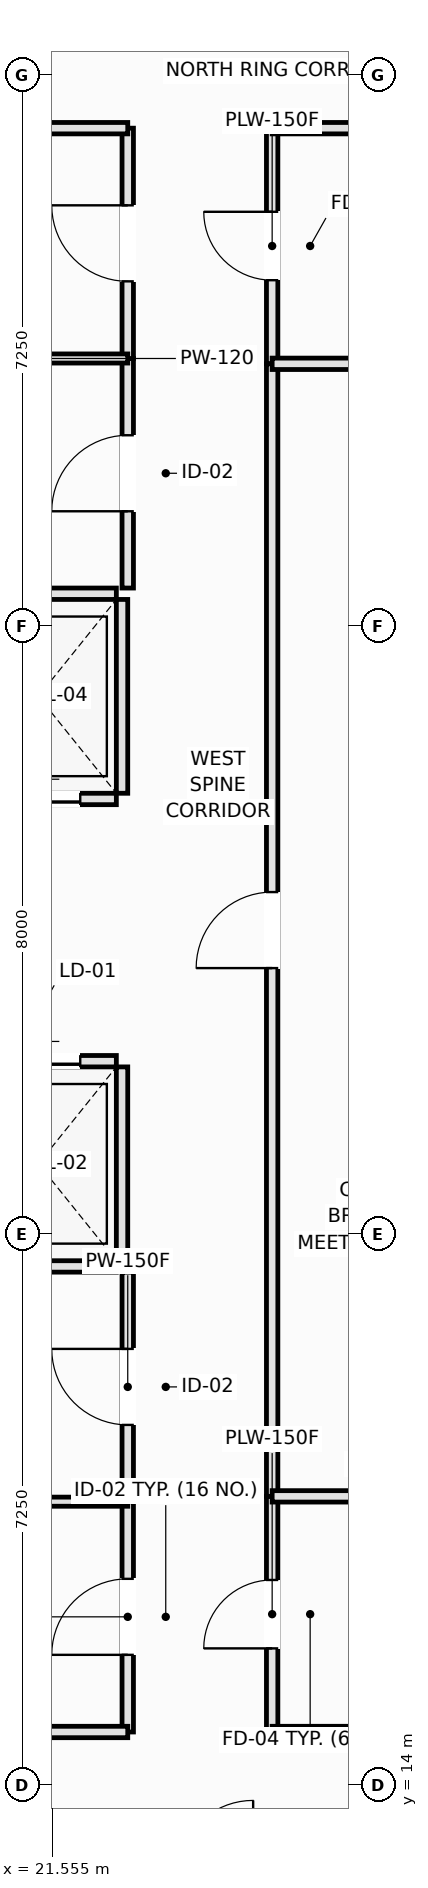
"""IFC4 building model, lengths in metres.
Left out: names, types, materials, properties, quantities, classifications, styles, units other than length and angle.
Written with IfcOpenShell. Run it as: python <this file> out.ifc"""

import sys

from ifc_helpers import new_model, si_unit, direction, frame, frame_2d, origin, place, context, subcontext, project, spatial, rectangle, extrude, element, fill, save


model = new_model("IFC4")
c1 = context("Model", 3, precision=1e-05, world=origin(), true_north=direction((0.0, 1.0)))
c2 = subcontext(c1, "Body", "Model", "MODEL_VIEW")
j1 = project(units=[si_unit("LENGTHUNIT", "METRE"), si_unit("PLANEANGLEUNIT", "RADIAN")], contexts=[c1])
p1 = place(None, origin())
s1 = spatial("IfcSite", under=j1, at=p1, CompositionType="ELEMENT")
p2 = place(p1, origin())
s2 = spatial("IfcBuilding", under=s1, at=p2, CompositionType="ELEMENT")
p3 = place(p2, frame((0.0, 0.0, 25.6)))
s3 = spatial("IfcBuildingStorey", under=s2, at=p3, CompositionType="ELEMENT", Elevation=25.6)
p4 = place(p3, frame((20.35, 20.825, 0.0), z_axis=(0.0, 0.0, 1.0), x_axis=(1.0, 0.0, 0.0)))
e1 = element("IfcWall", 1, at=p4, inside=s3, PredefinedType="PARTITIONING", context=c2, shape_type="SweptSolid", body=[
    extrude(rectangle(XDim=2.05, YDim=0.15, at=frame_2d((1.025, 0.0))), origin(), (0.0, 0.0, 1.0), 3.37),
])
p5 = place(p3, frame((20.35, 23.525, 0.0), z_axis=(0.0, 0.0, 1.0), x_axis=(1.0, 0.0, 0.0)))
e2 = element("IfcWall", 2, at=p5, inside=s3, PredefinedType="PARTITIONING", context=c2, shape_type="SweptSolid", body=[
    extrude(rectangle(XDim=2.05, YDim=0.15, at=frame_2d((1.025, 0.0))), origin(), (0.0, 0.0, 1.0), 3.37),
])
p6 = place(p5, frame((0.475, 0.0, 0.0)))
e3 = element("IfcOpeningElement", 3, at=p6, cuts=e2, PredefinedType="OPENING", context=c2, shape_type="SweptSolid", body=[
    extrude(rectangle(XDim=1.1, YDim=2.2, at=frame_2d((0.55, 1.1))), frame((0.0, 0.085, 0.0), z_axis=(0.0, -1.0, 0.0), x_axis=(1.0, 0.0, 0.0)), (0.0, 0.0, 1.0), 0.17),
])
p7 = place(p3, frame((22.475, 20.9, 0.0), z_axis=(0.0, 0.0, 1.0), x_axis=(0.0, 1.0, 0.0)))
e4 = element("IfcWall", 4, at=p7, inside=s3, PredefinedType="PARTITIONING", context=c2, shape_type="SweptSolid", body=[
    extrude(rectangle(XDim=2.55, YDim=0.15, at=frame_2d((1.275, 0.0))), origin(), (0.0, 0.0, 1.0), 3.37),
])
p8 = place(p3, frame((20.35, 26.975, 0.0), z_axis=(0.0, 0.0, 1.0), x_axis=(1.0, 0.0, 0.0)))
e5 = element("IfcWall", 5, at=p8, inside=s3, PredefinedType="PARTITIONING", context=c2, shape_type="SweptSolid", body=[
    extrude(rectangle(XDim=2.05, YDim=0.15, at=frame_2d((1.025, 0.0))), origin(), (0.0, 0.0, 1.0), 3.37),
])
p9 = place(p8, frame((0.475, 0.0, 0.0)))
e6 = element("IfcOpeningElement", 6, at=p9, cuts=e5, PredefinedType="OPENING", context=c2, shape_type="SweptSolid", body=[
    extrude(rectangle(XDim=1.1, YDim=2.2, at=frame_2d((0.55, 1.1))), frame((0.0, 0.085, 0.0), z_axis=(0.0, -1.0, 0.0), x_axis=(1.0, 0.0, 0.0)), (0.0, 0.0, 1.0), 0.17),
])
p10 = place(p3, frame((20.35, 29.675, 0.0), z_axis=(0.0, 0.0, 1.0), x_axis=(1.0, 0.0, 0.0)))
e7 = element("IfcWall", 7, at=p10, inside=s3, PredefinedType="PARTITIONING", context=c2, shape_type="SweptSolid", body=[
    extrude(rectangle(XDim=2.05, YDim=0.15, at=frame_2d((1.025, 0.0))), origin(), (0.0, 0.0, 1.0), 3.37),
])
p11 = place(p3, frame((22.475, 27.05, 0.0), z_axis=(0.0, 0.0, 1.0), x_axis=(0.0, 1.0, 0.0)))
e8 = element("IfcWall", 8, at=p11, inside=s3, PredefinedType="PARTITIONING", context=c2, shape_type="SweptSolid", body=[
    extrude(rectangle(XDim=2.55, YDim=0.15, at=frame_2d((1.275, 0.0))), origin(), (0.0, 0.0, 1.0), 3.37),
])
p12 = place(p3, frame((22.55, 14.7, 0.0), z_axis=(0.0, 0.0, 1.0), x_axis=(0.0, 1.0, 0.0)))
e9 = element("IfcWall", 9, at=p12, inside=s3, PredefinedType="PARTITIONING", context=c2, shape_type="SweptSolid", body=[
    extrude(rectangle(XDim=3.03, YDim=0.15, at=frame_2d((1.515, 0.0))), origin(), (0.0, 0.0, 1.0), 3.01),
])
p13 = place(p12, frame((1.015, 0.0, 0.0)))
e10 = element("IfcOpeningElement", 10, at=p13, cuts=e9, PredefinedType="OPENING", context=c2, shape_type="SweptSolid", body=[
    extrude(rectangle(XDim=1.0, YDim=2.15, at=frame_2d((0.5, 1.075))), frame((0.0, 0.085, 0.0), z_axis=(0.0, -1.0, 0.0), x_axis=(1.0, 0.0, 0.0)), (0.0, 0.0, 1.0), 0.17),
])
p14 = place(p3, frame((22.55, 17.73, 0.0), z_axis=(0.0, 0.0, 1.0), x_axis=(0.0, 1.0, 0.0)))
e11 = element("IfcWall", 11, at=p14, inside=s3, PredefinedType="PARTITIONING", context=c2, shape_type="SweptSolid", body=[
    extrude(rectangle(XDim=3.02, YDim=0.15, at=frame_2d((1.51, 0.0))), origin(), (0.0, 0.0, 1.0), 3.01),
])
p15 = place(p14, frame((1.01, 0.0, 0.0)))
e12 = element("IfcOpeningElement", 12, at=p15, cuts=e11, PredefinedType="OPENING", context=c2, shape_type="SweptSolid", body=[
    extrude(rectangle(XDim=1.0, YDim=2.15, at=frame_2d((0.5, 1.075))), frame((0.0, 0.085, 0.0), z_axis=(0.0, -1.0, 0.0), x_axis=(1.0, 0.0, 0.0)), (0.0, 0.0, 1.0), 0.17),
])
p16 = place(p3, frame((22.55, 29.75, 0.0), z_axis=(0.0, 0.0, 1.0), x_axis=(0.0, 1.0, 0.0)))
e13 = element("IfcWall", 13, at=p16, inside=s3, PredefinedType="PARTITIONING", context=c2, shape_type="SweptSolid", body=[
    extrude(rectangle(XDim=3.02, YDim=0.15, at=frame_2d((1.51, 0.0))), origin(), (0.0, 0.0, 1.0), 3.01),
])
p17 = place(p16, frame((1.01, 0.0, 0.0)))
e14 = element("IfcOpeningElement", 14, at=p17, cuts=e13, PredefinedType="OPENING", context=c2, shape_type="SweptSolid", body=[
    extrude(rectangle(XDim=1.0, YDim=2.15, at=frame_2d((0.5, 1.075))), frame((0.0, 0.085, 0.0), z_axis=(0.0, -1.0, 0.0), x_axis=(1.0, 0.0, 0.0)), (0.0, 0.0, 1.0), 0.17),
])
p18 = place(p3, frame((22.55, 32.77, 0.0), z_axis=(0.0, 0.0, 1.0), x_axis=(0.0, 1.0, 0.0)))
e15 = element("IfcWall", 15, at=p18, inside=s3, PredefinedType="PARTITIONING", context=c2, shape_type="SweptSolid", body=[
    extrude(rectangle(XDim=3.03, YDim=0.15, at=frame_2d((1.515, 0.0))), origin(), (0.0, 0.0, 1.0), 3.01),
])
p19 = place(p18, frame((1.015, 0.0, 0.0)))
e16 = element("IfcOpeningElement", 16, at=p19, cuts=e15, PredefinedType="OPENING", context=c2, shape_type="SweptSolid", body=[
    extrude(rectangle(XDim=1.0, YDim=2.15, at=frame_2d((0.5, 1.075))), frame((0.0, 0.085, 0.0), z_axis=(0.0, -1.0, 0.0), x_axis=(1.0, 0.0, 0.0)), (0.0, 0.0, 1.0), 0.17),
])
p20 = place(p3, frame((24.45, 14.7, 0.0), z_axis=(0.0, 0.0, 1.0), x_axis=(0.0, 1.0, 0.0)))
e17 = element("IfcWall", 17, at=p20, inside=s3, PredefinedType="PLUMBINGWALL", context=c2, shape_type="SweptSolid", body=[
    extrude(rectangle(XDim=3.1, YDim=0.15, at=frame_2d((1.55, 0.0))), origin(), (0.0, 0.0, 1.0), 3.37),
])
p21 = place(p20, frame((1.1, 0.0, 0.0)))
e18 = element("IfcOpeningElement", 18, at=p21, cuts=e17, PredefinedType="OPENING", context=c2, shape_type="SweptSolid", body=[
    extrude(rectangle(XDim=0.9, YDim=2.1, at=frame_2d((0.45, 1.05))), frame((0.0, 0.085, 0.0), z_axis=(0.0, -1.0, 0.0), x_axis=(1.0, 0.0, 0.0)), (0.0, 0.0, 1.0), 0.17),
])
p22 = place(p3, frame((24.45, 32.7, 0.0), z_axis=(0.0, 0.0, 1.0), x_axis=(0.0, 1.0, 0.0)))
e19 = element("IfcWall", 19, at=p22, inside=s3, PredefinedType="PLUMBINGWALL", context=c2, shape_type="SweptSolid", body=[
    extrude(rectangle(XDim=3.1, YDim=0.15, at=frame_2d((1.55, 0.0))), origin(), (0.0, 0.0, 1.0), 3.37),
])
p23 = place(p22, frame((1.1, 0.0, 0.0)))
e20 = element("IfcOpeningElement", 20, at=p23, cuts=e19, PredefinedType="OPENING", context=c2, shape_type="SweptSolid", body=[
    extrude(rectangle(XDim=0.9, YDim=2.1, at=frame_2d((0.45, 1.05))), frame((0.0, 0.085, 0.0), z_axis=(0.0, -1.0, 0.0), x_axis=(1.0, 0.0, 0.0)), (0.0, 0.0, 1.0), 0.17),
])
p24 = place(p3, frame((24.45, 17.8, 0.0), z_axis=(0.0, 0.0, 1.0), x_axis=(0.0, 1.0, 0.0)))
e21 = element("IfcWall", 21, at=p24, inside=s3, PredefinedType="PARTITIONING", context=c2, shape_type="SweptSolid", body=[
    extrude(rectangle(XDim=14.9, YDim=0.15, at=frame_2d((7.45, 0.0))), origin(), (0.0, 0.0, 1.0), 3.37),
])
p25 = place(p24, frame((6.95, 0.0, 0.0)))
e22 = element("IfcOpeningElement", 22, at=p25, cuts=e21, PredefinedType="OPENING", context=c2, shape_type="SweptSolid", body=[
    extrude(rectangle(XDim=1.0, YDim=2.15, at=frame_2d((0.5, 1.075))), frame((0.0, 0.085, 0.0), z_axis=(0.0, -1.0, 0.0), x_axis=(1.0, 0.0, 0.0)), (0.0, 0.0, 1.0), 0.17),
])
p26 = place(p3, frame((19.9, 14.7, 0.0), z_axis=(0.0, 0.0, 1.0), x_axis=(1.0, 0.0, 0.0)))
e23 = element("IfcWall", 23, at=p26, inside=s3, PredefinedType="PARTITIONING", context=c2, shape_type="SweptSolid", body=[
    extrude(rectangle(XDim=2.65, YDim=0.15, at=frame_2d((1.325, 0.0))), origin(), (0.0, 0.0, 1.0), 3.37),
])
p27 = place(p3, frame((24.45, 14.7, 0.0), z_axis=(0.0, 0.0, 1.0), x_axis=(1.0, 0.0, 0.0)))
e24 = element("IfcWall", 24, at=p27, inside=s3, PredefinedType="PLUMBINGWALL", context=c2, shape_type="SweptSolid", body=[
    extrude(rectangle(XDim=3.15, YDim=0.15, at=frame_2d((1.575, 0.0))), origin(), (0.0, 0.0, 1.0), 3.37),
])
p28 = place(p3, frame((19.9, 35.8, 0.0), z_axis=(0.0, 0.0, 1.0), x_axis=(1.0, 0.0, 0.0)))
e25 = element("IfcWall", 25, at=p28, inside=s3, PredefinedType="PARTITIONING", context=c2, shape_type="SweptSolid", body=[
    extrude(rectangle(XDim=2.65, YDim=0.15, at=frame_2d((1.325, 0.0))), origin(), (0.0, 0.0, 1.0), 3.37),
])
p29 = place(p3, frame((24.45, 35.8, 0.0), z_axis=(0.0, 0.0, 1.0), x_axis=(1.0, 0.0, 0.0)))
e26 = element("IfcWall", 26, at=p29, inside=s3, PredefinedType="PLUMBINGWALL", context=c2, shape_type="SweptSolid", body=[
    extrude(rectangle(XDim=3.15, YDim=0.15, at=frame_2d((1.575, 0.0))), origin(), (0.0, 0.0, 1.0), 3.37),
])
for number, where, z_axis, x_axis in (
    (27, (19.9, 17.73, 0.0), (0.0, 0.0, 1.0), (1.0, 0.0, 0.0)),
    (28, (19.9, 32.77, 0.0), (0.0, 0.0, 1.0), (1.0, 0.0, 0.0)),
):
    element("IfcWall", number, at=place(p3, frame(where, z_axis=z_axis, x_axis=x_axis)), inside=s3, PredefinedType="PARTITIONING", context=c2, shape_type="SweptSolid", body=[
        extrude(rectangle(XDim=2.65, YDim=0.12, at=frame_2d((1.325, 0.0))), origin(), (0.0, 0.0, 1.0), 3.37),
    ])
for number, where, z_axis, x_axis in (
    (29, (24.45, 17.8, 0.0), (0.0, 0.0, 1.0), (1.0, 0.0, 0.0)),
    (30, (24.45, 32.7, 0.0), (0.0, 0.0, 1.0), (1.0, 0.0, 0.0)),
):
    element("IfcWall", number, at=place(p3, frame(where, z_axis=z_axis, x_axis=x_axis)), inside=s3, PredefinedType="PLUMBINGWALL", context=c2, shape_type="SweptSolid", body=[
        extrude(rectangle(XDim=3.05, YDim=0.15, at=frame_2d((1.525, 0.0))), origin(), (0.0, 0.0, 1.0), 3.37),
    ])
p30 = place(p6, origin())
e31 = element("IfcDoor", 31, at=p30, inside=s3, OperationType="DOUBLE_DOOR_SLIDING", PredefinedType="DOOR", context=c2, shape_type="SweptSolid", body=[
    extrude(rectangle(XDim=1.1, YDim=2.2, at=frame_2d((0.55, 1.1))), frame((0.0, 0.025, 0.0), z_axis=(0.0, -1.0, 0.0), x_axis=(1.0, 0.0, 0.0)), (0.0, 0.0, 1.0), 0.05),
])
fill(e3, e31)
p31 = place(p9, origin())
e32 = element("IfcDoor", 32, at=p31, inside=s3, OperationType="DOUBLE_DOOR_SLIDING", PredefinedType="DOOR", context=c2, shape_type="SweptSolid", body=[
    extrude(rectangle(XDim=1.1, YDim=2.2, at=frame_2d((0.55, 1.1))), frame((0.0, 0.025, 0.0), z_axis=(0.0, -1.0, 0.0), x_axis=(1.0, 0.0, 0.0)), (0.0, 0.0, 1.0), 0.05),
])
fill(e6, e32)
p32 = place(p13, origin())
e33 = element("IfcDoor", 33, at=p32, inside=s3, OperationType="SINGLE_SWING_LEFT", PredefinedType="DOOR", context=c2, shape_type="SweptSolid", body=[
    extrude(rectangle(XDim=1.0, YDim=2.15, at=frame_2d((0.5, 1.075))), frame((0.0, 0.025, 0.0), z_axis=(0.0, -1.0, 0.0), x_axis=(1.0, 0.0, 0.0)), (0.0, 0.0, 1.0), 0.05),
])
fill(e10, e33)
p33 = place(p15, origin())
e34 = element("IfcDoor", 34, at=p33, inside=s3, OperationType="SINGLE_SWING_RIGHT", PredefinedType="DOOR", context=c2, shape_type="SweptSolid", body=[
    extrude(rectangle(XDim=1.0, YDim=2.15, at=frame_2d((0.5, 1.075))), frame((0.0, 0.025, 0.0), z_axis=(0.0, -1.0, 0.0), x_axis=(1.0, 0.0, 0.0)), (0.0, 0.0, 1.0), 0.05),
])
fill(e12, e34)
p34 = place(p17, origin())
e35 = element("IfcDoor", 35, at=p34, inside=s3, OperationType="SINGLE_SWING_LEFT", PredefinedType="DOOR", context=c2, shape_type="SweptSolid", body=[
    extrude(rectangle(XDim=1.0, YDim=2.15, at=frame_2d((0.5, 1.075))), frame((0.0, 0.025, 0.0), z_axis=(0.0, -1.0, 0.0), x_axis=(1.0, 0.0, 0.0)), (0.0, 0.0, 1.0), 0.05),
])
fill(e14, e35)
p35 = place(p19, origin())
e36 = element("IfcDoor", 36, at=p35, inside=s3, OperationType="SINGLE_SWING_RIGHT", PredefinedType="DOOR", context=c2, shape_type="SweptSolid", body=[
    extrude(rectangle(XDim=1.0, YDim=2.15, at=frame_2d((0.5, 1.075))), frame((0.0, 0.025, 0.0), z_axis=(0.0, -1.0, 0.0), x_axis=(1.0, 0.0, 0.0)), (0.0, 0.0, 1.0), 0.05),
])
fill(e16, e36)
p36 = place(p21, origin())
e37 = element("IfcDoor", 37, at=p36, inside=s3, OperationType="SINGLE_SWING_LEFT", PredefinedType="DOOR", context=c2, shape_type="SweptSolid", body=[
    extrude(rectangle(XDim=0.9, YDim=2.1, at=frame_2d((0.45, 1.05))), frame((0.0, 0.025, 0.0), z_axis=(0.0, -1.0, 0.0), x_axis=(1.0, 0.0, 0.0)), (0.0, 0.0, 1.0), 0.05),
])
fill(e18, e37)
p37 = place(p23, origin())
e38 = element("IfcDoor", 38, at=p37, inside=s3, OperationType="SINGLE_SWING_RIGHT", PredefinedType="DOOR", context=c2, shape_type="SweptSolid", body=[
    extrude(rectangle(XDim=0.9, YDim=2.1, at=frame_2d((0.45, 1.05))), frame((0.0, 0.025, 0.0), z_axis=(0.0, -1.0, 0.0), x_axis=(1.0, 0.0, 0.0)), (0.0, 0.0, 1.0), 0.05),
])
fill(e20, e38)
p38 = place(p25, origin())
e39 = element("IfcDoor", 39, at=p38, inside=s3, OperationType="SINGLE_SWING_LEFT", PredefinedType="DOOR", context=c2, shape_type="SweptSolid", body=[
    extrude(rectangle(XDim=1.0, YDim=2.15, at=frame_2d((0.5, 1.075))), frame((0.0, 0.025, 0.0), z_axis=(0.0, -1.0, 0.0), x_axis=(1.0, 0.0, 0.0)), (0.0, 0.0, 1.0), 0.05),
])
fill(e22, e39)
save(model, sys.argv[1])
